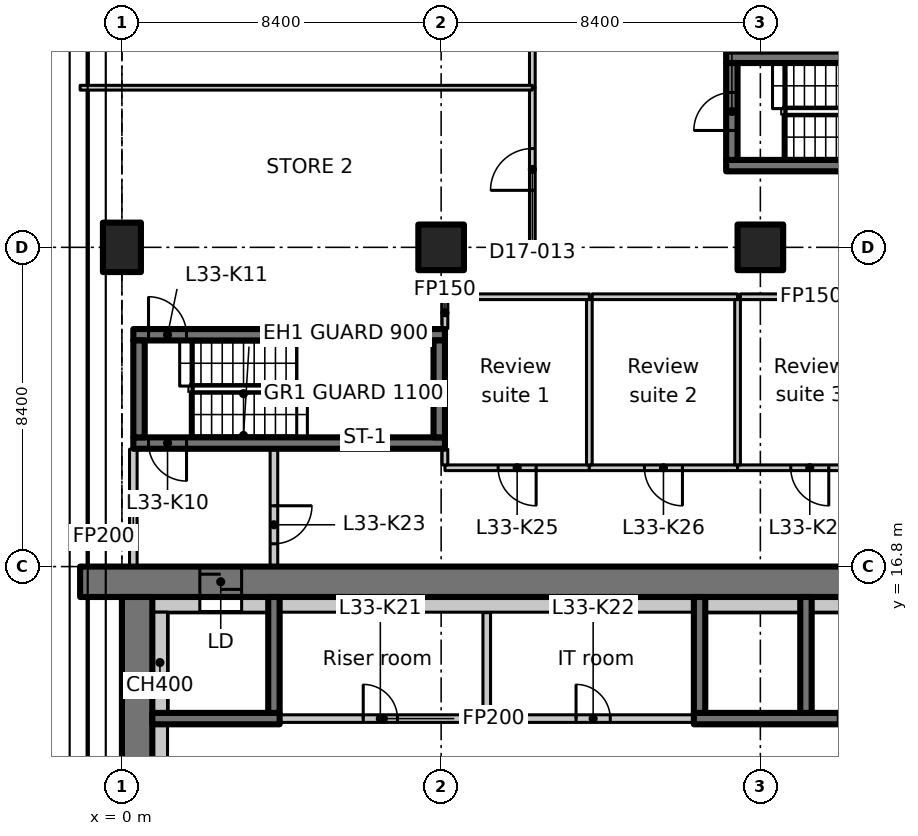
"""IFC4 building model, lengths in metres.
Left out: names, types, materials, properties, quantities, classifications, styles, units other than length and angle.
Written with IfcOpenShell. Run it as: python <this file> out.ifc"""

import sys

from ifc_helpers import new_model, si_unit, direction, frame, frame_2d, origin, origin_2d, place, context, subcontext, project, spatial, polyline, rectangle, outline, extrude, element, fill, save


model = new_model("IFC4")
c1 = context("Model", 3, precision=1e-05, world=origin(), true_north=direction((0.0, 1.0)))
c2 = subcontext(c1, "Body", "Model", "MODEL_VIEW")
j1 = project(units=[si_unit("LENGTHUNIT", "METRE"), si_unit("PLANEANGLEUNIT", "RADIAN")], contexts=[c1])
p1 = place(None, origin())
s1 = spatial("IfcSite", under=j1, at=p1, CompositionType="ELEMENT")
p2 = place(p1, origin())
s2 = spatial("IfcBuilding", under=s1, at=p2, CompositionType="ELEMENT")
p3 = place(p2, frame((0.0, 0.0, 134.9)))
s3 = spatial("IfcBuildingStorey", under=s2, at=p3, CompositionType="ELEMENT", Elevation=134.9)
p4 = place(p3, frame((0.0, 25.2, 0.0), z_axis=(0.0, 0.0, 1.0), x_axis=(1.0, 0.0, 0.0)))
e1 = element("IfcColumn", 1, at=p4, inside=s3, PredefinedType="COLUMN", context=c2, shape_type="SweptSolid", body=[
    extrude(rectangle(XDim=1.0, YDim=1.3, at=origin_2d()), origin(), (0.0, 0.0, 1.0), 3.35),
])
for number, where, z_axis, x_axis in (
    (2, (8.4, 25.2, 0.0), (0.0, 0.0, 1.0), (1.0, 0.0, 0.0)),
    (3, (16.8, 25.2, 0.0), (0.0, 0.0, 1.0), (1.0, 0.0, 0.0)),
):
    element("IfcColumn", number, at=place(p3, frame(where, z_axis=z_axis, x_axis=x_axis)), inside=s3, PredefinedType="COLUMN", context=c2, shape_type="SweptSolid", body=[
        extrude(rectangle(XDim=1.2, YDim=1.2, at=origin_2d()), origin(), (0.0, 0.0, 1.0), 3.35),
    ])
p5 = place(p3, frame((-1.1, 16.4, 0.0), z_axis=(0.0, 0.0, 1.0), x_axis=(1.0, 0.0, 0.0)))
e4 = element("IfcWall", 4, at=p5, inside=s3, PredefinedType="SHEAR", context=c2, shape_type="SweptSolid", body=[
    extrude(rectangle(XDim=22.1, YDim=0.8, at=frame_2d((11.05, 0.0))), origin(), (0.0, 0.0, 1.0), 3.35),
])
p6 = place(p5, frame((3.15, 0.0, 0.0)))
e5 = element("IfcOpeningElement", 5, at=p6, cuts=e4, PredefinedType="OPENING", context=c2, shape_type="SweptSolid", body=[
    extrude(rectangle(XDim=1.1, YDim=2.3, at=frame_2d((0.55, 1.15))), frame((0.0, 0.41, 0.0), z_axis=(0.0, -1.0, 0.0), x_axis=(1.0, 0.0, 0.0)), (0.0, 0.0, 1.0), 0.82),
])
p7 = place(p3, frame((0.4, 7.136, 0.0), z_axis=(0.0, 0.0, 1.0), x_axis=(0.0, 1.0, 0.0)))
e6 = element("IfcWall", 6, at=p7, inside=s3, PredefinedType="SHEAR", context=c2, shape_type="SweptSolid", body=[
    extrude(rectangle(XDim=8.864, YDim=0.8, at=frame_2d((4.432, 0.0))), origin(), (0.0, 0.0, 1.0), 3.35),
])
p8 = place(p3, frame((0.8, 15.8, 0.0), z_axis=(0.0, 0.0, 1.0), x_axis=(1.0, 0.0, 0.0)))
e7 = element("IfcWall", 7, at=p8, inside=s3, PredefinedType="PARTITIONING", context=c2, shape_type="SweptSolid", body=[
    extrude(rectangle(XDim=1.25, YDim=0.4, at=frame_2d((0.625, 0.0))), origin(), (0.0, 0.0, 1.0), 3.35),
])
p9 = place(p3, frame((0.8, 12.8, 0.0), z_axis=(0.0, 0.0, 1.0), x_axis=(1.0, 0.0, 0.0)))
e8 = element("IfcWall", 8, at=p9, inside=s3, PredefinedType="SHEAR", context=c2, shape_type="SweptSolid", body=[
    extrude(rectangle(XDim=3.35, YDim=0.3, at=frame_2d((1.675, 0.0))), origin(), (0.0, 0.0, 1.0), 3.35),
])
p10 = place(p3, frame((4.0, 12.95, 0.0), z_axis=(0.0, 0.0, 1.0), x_axis=(0.0, 1.0, 0.0)))
e9 = element("IfcWall", 9, at=p10, inside=s3, PredefinedType="SHEAR", context=c2, shape_type="SweptSolid", body=[
    extrude(rectangle(XDim=3.05, YDim=0.3, at=frame_2d((1.525, 0.0))), origin(), (0.0, 0.0, 1.0), 3.35),
])
p11 = place(p3, frame((15.05, 12.8, 0.0), z_axis=(0.0, 0.0, 1.0), x_axis=(1.0, 0.0, 0.0)))
e10 = element("IfcWall", 10, at=p11, inside=s3, PredefinedType="SHEAR", context=c2, shape_type="SweptSolid", body=[
    extrude(rectangle(XDim=5.9, YDim=0.3, at=frame_2d((2.95, 0.0))), origin(), (0.0, 0.0, 1.0), 3.35),
])
p12 = place(p11, frame((3.8, 0.0, 0.0)))
e11 = element("IfcOpeningElement", 11, at=p12, cuts=e10, PredefinedType="OPENING", context=c2, shape_type="SweptSolid", body=[
    extrude(rectangle(XDim=1.1, YDim=2.3, at=frame_2d((0.55, 1.15))), frame((0.0, 0.16, 0.0), z_axis=(0.0, -1.0, 0.0), x_axis=(1.0, 0.0, 0.0)), (0.0, 0.0, 1.0), 0.32),
])
for number, where, z_axis, x_axis in (
    (12, (15.2, 12.95, 0.0), (0.0, 0.0, 1.0), (0.0, 1.0, 0.0)),
    (13, (18.0, 12.95, 0.0), (0.0, 0.0, 1.0), (0.0, 1.0, 0.0)),
):
    element("IfcWall", number, at=place(p3, frame(where, z_axis=z_axis, x_axis=x_axis)), inside=s3, PredefinedType="SHEAR", context=c2, shape_type="SweptSolid", body=[
        extrude(rectangle(XDim=3.05, YDim=0.3, at=frame_2d((1.525, 0.0))), origin(), (0.0, 0.0, 1.0), 3.35),
    ])
p13 = place(p3, frame((8.5, 20.05, 0.0), z_axis=(0.0, 0.0, 1.0), x_axis=(-1.0, 0.0, 0.0)))
e14 = element("IfcWall", 14, at=p13, inside=s3, PredefinedType="SHEAR", context=c2, shape_type="SweptSolid", body=[
    extrude(rectangle(XDim=8.2, YDim=0.3, at=frame_2d((4.1, 0.0))), origin(), (0.0, 0.0, 1.0), 3.35),
])
p14 = place(p13, frame((6.8, 0.0, 0.0)))
e15 = element("IfcOpeningElement", 15, at=p14, cuts=e14, PredefinedType="OPENING", context=c2, shape_type="SweptSolid", body=[
    extrude(rectangle(XDim=1.0, YDim=2.1, at=frame_2d((0.5, 1.05))), frame((0.0, 0.16, 0.0), z_axis=(0.0, -1.0, 0.0), x_axis=(1.0, 0.0, 0.0)), (0.0, 0.0, 1.0), 0.32),
])
p15 = place(p3, frame((0.3, 22.9, 0.0), z_axis=(0.0, 0.0, 1.0), x_axis=(1.0, 0.0, 0.0)))
e16 = element("IfcWall", 16, at=p15, inside=s3, PredefinedType="SHEAR", context=c2, shape_type="SweptSolid", body=[
    extrude(rectangle(XDim=8.2, YDim=0.3, at=frame_2d((4.1, 0.0))), origin(), (0.0, 0.0, 1.0), 3.35),
])
p16 = place(p15, frame((0.4, 0.0, 0.0)))
e17 = element("IfcOpeningElement", 17, at=p16, cuts=e16, PredefinedType="OPENING", context=c2, shape_type="SweptSolid", body=[
    extrude(rectangle(XDim=1.0, YDim=2.1, at=frame_2d((0.5, 1.05))), frame((0.0, 0.16, 0.0), z_axis=(0.0, -1.0, 0.0), x_axis=(1.0, 0.0, 0.0)), (0.0, 0.0, 1.0), 0.32),
])
for number, where, z_axis, x_axis in (
    (18, (0.45, 20.2, 0.0), (0.0, 0.0, 1.0), (0.0, 1.0, 0.0)),
    (19, (8.35, 20.2, 0.0), (0.0, 0.0, 1.0), (0.0, 1.0, 0.0)),
):
    element("IfcWall", number, at=place(p3, frame(where, z_axis=z_axis, x_axis=x_axis)), inside=s3, PredefinedType="SHEAR", context=c2, shape_type="SweptSolid", body=[
        extrude(rectangle(XDim=2.55, YDim=0.3, at=frame_2d((1.275, 0.0))), origin(), (0.0, 0.0, 1.0), 3.35),
    ])
for number, where, z_axis, x_axis in (
    (20, (15.9, 27.35, 0.0), (0.0, 0.0, 1.0), (1.0, 0.0, 0.0)),
    (21, (15.9, 30.2, 0.0), (0.0, 0.0, 1.0), (1.0, 0.0, 0.0)),
):
    element("IfcWall", number, at=place(p3, frame(where, z_axis=z_axis, x_axis=x_axis)), inside=s3, PredefinedType="SHEAR", context=c2, shape_type="SweptSolid", body=[
        extrude(rectangle(XDim=8.2, YDim=0.3, at=frame_2d((4.1, 0.0))), origin(), (0.0, 0.0, 1.0), 3.35),
    ])
p17 = place(p3, frame((16.05, 27.5, 0.0), z_axis=(0.0, 0.0, 1.0), x_axis=(0.0, 1.0, 0.0)))
e22 = element("IfcWall", 22, at=p17, inside=s3, PredefinedType="SHEAR", context=c2, shape_type="SweptSolid", body=[
    extrude(rectangle(XDim=2.55, YDim=0.3, at=frame_2d((1.275, 0.0))), origin(), (0.0, 0.0, 1.0), 3.35),
])
p18 = place(p17, frame((0.775, 0.0, 0.0)))
e23 = element("IfcOpeningElement", 23, at=p18, cuts=e22, PredefinedType="OPENING", context=c2, shape_type="SweptSolid", body=[
    extrude(rectangle(XDim=1.0, YDim=2.1, at=frame_2d((0.5, 1.05))), frame((0.0, 0.16, 0.0), z_axis=(0.0, -1.0, 0.0), x_axis=(1.0, 0.0, 0.0)), (0.0, 0.0, 1.0), 0.32),
])
p19 = place(p3, frame((0.3, 16.812, 0.0), z_axis=(0.0, 0.0, 1.0), x_axis=(0.0, 1.0, 0.0)))
e24 = element("IfcWall", 24, at=p19, inside=s3, PredefinedType="PARTITIONING", context=c2, shape_type="SweptSolid", body=[
    extrude(rectangle(XDim=3.076, YDim=0.2, at=frame_2d((1.538, 0.0))), origin(), (0.0, 0.0, 1.0), 2.98),
])
p20 = place(p3, frame((4.0, 19.888, 0.0), z_axis=(0.0, 0.0, 1.0), x_axis=(0.0, -1.0, 0.0)))
e25 = element("IfcWall", 25, at=p20, inside=s3, PredefinedType="PARTITIONING", context=c2, shape_type="SweptSolid", body=[
    extrude(rectangle(XDim=3.076, YDim=0.2, at=frame_2d((1.538, 0.0))), origin(), (0.0, 0.0, 1.0), 3.35),
])
p21 = place(p20, frame((1.488, 0.0, 0.0)))
e26 = element("IfcOpeningElement", 26, at=p21, cuts=e25, PredefinedType="OPENING", context=c2, shape_type="SweptSolid", body=[
    extrude(rectangle(XDim=1.0, YDim=2.1, at=frame_2d((0.5, 1.05))), frame((0.0, 0.11, 0.0), z_axis=(0.0, -1.0, 0.0), x_axis=(1.0, 0.0, 0.0)), (0.0, 0.0, 1.0), 0.22),
])
p22 = place(p3, frame((4.162, 12.8, 0.0), z_axis=(0.0, 0.0, 1.0), x_axis=(1.0, 0.0, 0.0)))
e27 = element("IfcWall", 27, at=p22, inside=s3, PredefinedType="PARTITIONING", context=c2, shape_type="SweptSolid", body=[
    extrude(rectangle(XDim=5.438, YDim=0.2, at=frame_2d((2.719, 0.0))), origin(), (0.0, 0.0, 1.0), 3.35),
])
p23 = place(p22, frame((2.188, 0.0, 0.0)))
e28 = element("IfcOpeningElement", 28, at=p23, cuts=e27, PredefinedType="OPENING", context=c2, shape_type="SweptSolid", body=[
    extrude(rectangle(XDim=0.9, YDim=2.1, at=frame_2d((0.45, 1.05))), frame((0.0, 0.11, 0.0), z_axis=(0.0, -1.0, 0.0), x_axis=(1.0, 0.0, 0.0)), (0.0, 0.0, 1.0), 0.22),
])
p24 = place(p3, frame((9.6, 12.8, 0.0), z_axis=(0.0, 0.0, 1.0), x_axis=(1.0, 0.0, 0.0)))
e29 = element("IfcWall", 29, at=p24, inside=s3, PredefinedType="PARTITIONING", context=c2, shape_type="SweptSolid", body=[
    extrude(rectangle(XDim=5.438, YDim=0.2, at=frame_2d((2.719, 0.0))), origin(), (0.0, 0.0, 1.0), 3.35),
])
p25 = place(p24, frame((2.35, 0.0, 0.0)))
e30 = element("IfcOpeningElement", 30, at=p25, cuts=e29, PredefinedType="OPENING", context=c2, shape_type="SweptSolid", body=[
    extrude(rectangle(XDim=0.9, YDim=2.1, at=frame_2d((0.45, 1.05))), frame((0.0, 0.11, 0.0), z_axis=(0.0, -1.0, 0.0), x_axis=(1.0, 0.0, 0.0)), (0.0, 0.0, 1.0), 0.22),
])
p26 = place(p3, frame((9.6, 15.588, 0.0), z_axis=(0.0, 0.0, 1.0), x_axis=(0.0, -1.0, 0.0)))
e31 = element("IfcWall", 31, at=p26, inside=s3, PredefinedType="PARTITIONING", context=c2, shape_type="SweptSolid", body=[
    extrude(rectangle(XDim=2.688, YDim=0.2, at=frame_2d((1.344, 0.0))), origin(), (0.0, 0.0, 1.0), 3.35),
])
p27 = place(p3, frame((12.3, 19.4, 0.0), z_axis=(0.0, 0.0, 1.0), x_axis=(-1.0, 0.0, 0.0)))
e32 = element("IfcWall", 32, at=p27, inside=s3, PredefinedType="PARTITIONING", context=c2, shape_type="SweptSolid", body=[
    extrude(rectangle(XDim=3.8, YDim=0.15, at=frame_2d((1.9, 0.0))), origin(), (0.0, 0.0, 1.0), 3.35),
])
p28 = place(p27, frame((1.4, 0.0, 0.0)))
e33 = element("IfcOpeningElement", 33, at=p28, cuts=e32, PredefinedType="OPENING", context=c2, shape_type="SweptSolid", body=[
    extrude(rectangle(XDim=1.0, YDim=2.1, at=frame_2d((0.5, 1.05))), frame((0.0, 0.085, 0.0), z_axis=(0.0, -1.0, 0.0), x_axis=(1.0, 0.0, 0.0)), (0.0, 0.0, 1.0), 0.17),
])
p29 = place(p3, frame((8.5, 19.475, 0.0), z_axis=(0.0, 0.0, 1.0), x_axis=(0.0, 1.0, 0.0)))
e34 = element("IfcWall", 34, at=p29, inside=s3, PredefinedType="PARTITIONING", context=c2, shape_type="SweptSolid", body=[
    extrude(rectangle(XDim=0.413, YDim=0.15, at=frame_2d((0.207, 0.0))), origin(), (0.0, 0.0, 1.0), 3.35),
])
p30 = place(p3, frame((8.5, 23.062, 0.0), z_axis=(0.0, 0.0, 1.0), x_axis=(0.0, 1.0, 0.0)))
e35 = element("IfcWall", 35, at=p30, inside=s3, PredefinedType="PARTITIONING", context=c2, shape_type="SweptSolid", body=[
    extrude(rectangle(XDim=0.838, YDim=0.15, at=frame_2d((0.419, 0.0))), origin(), (0.0, 0.0, 1.0), 3.35),
])
p31 = place(p3, frame((8.575, 23.9, 0.0), z_axis=(0.0, 0.0, 1.0), x_axis=(1.0, 0.0, 0.0)))
e36 = element("IfcWall", 36, at=p31, inside=s3, PredefinedType="PARTITIONING", context=c2, shape_type="SweptSolid", body=[
    extrude(rectangle(XDim=3.725, YDim=0.15, at=frame_2d((1.863, 0.0))), origin(), (0.0, 0.0, 1.0), 3.35),
])
p32 = place(p3, frame((16.2, 19.4, 0.0), z_axis=(0.0, 0.0, 1.0), x_axis=(-1.0, 0.0, 0.0)))
e37 = element("IfcWall", 37, at=p32, inside=s3, PredefinedType="PARTITIONING", context=c2, shape_type="SweptSolid", body=[
    extrude(rectangle(XDim=3.9, YDim=0.15, at=frame_2d((1.95, 0.0))), origin(), (0.0, 0.0, 1.0), 3.35),
])
p33 = place(p32, frame((1.45, 0.0, 0.0)))
e38 = element("IfcOpeningElement", 38, at=p33, cuts=e37, PredefinedType="OPENING", context=c2, shape_type="SweptSolid", body=[
    extrude(rectangle(XDim=1.0, YDim=2.1, at=frame_2d((0.5, 1.05))), frame((0.0, 0.085, 0.0), z_axis=(0.0, -1.0, 0.0), x_axis=(1.0, 0.0, 0.0)), (0.0, 0.0, 1.0), 0.17),
])
p34 = place(p3, frame((12.3, 23.825, 0.0), z_axis=(0.0, 0.0, 1.0), x_axis=(0.0, -1.0, 0.0)))
e39 = element("IfcWall", 39, at=p34, inside=s3, PredefinedType="PARTITIONING", context=c2, shape_type="SweptSolid", body=[
    extrude(rectangle(XDim=4.35, YDim=0.15, at=frame_2d((2.175, 0.0))), origin(), (0.0, 0.0, 1.0), 3.35),
])
p35 = place(p3, frame((12.375, 23.9, 0.0), z_axis=(0.0, 0.0, 1.0), x_axis=(1.0, 0.0, 0.0)))
e40 = element("IfcWall", 40, at=p35, inside=s3, PredefinedType="PARTITIONING", context=c2, shape_type="SweptSolid", body=[
    extrude(rectangle(XDim=3.825, YDim=0.15, at=frame_2d((1.913, 0.0))), origin(), (0.0, 0.0, 1.0), 3.35),
])
p36 = place(p3, frame((19.925, 19.4, 0.0), z_axis=(0.0, 0.0, 1.0), x_axis=(-1.0, 0.0, 0.0)))
e41 = element("IfcWall", 41, at=p36, inside=s3, PredefinedType="PARTITIONING", context=c2, shape_type="SweptSolid", body=[
    extrude(rectangle(XDim=3.725, YDim=0.15, at=frame_2d((1.863, 0.0))), origin(), (0.0, 0.0, 1.0), 3.35),
])
p37 = place(p36, frame((1.325, 0.0, 0.0)))
e42 = element("IfcOpeningElement", 42, at=p37, cuts=e41, PredefinedType="OPENING", context=c2, shape_type="SweptSolid", body=[
    extrude(rectangle(XDim=1.0, YDim=2.1, at=frame_2d((0.5, 1.05))), frame((0.0, 0.085, 0.0), z_axis=(0.0, -1.0, 0.0), x_axis=(1.0, 0.0, 0.0)), (0.0, 0.0, 1.0), 0.17),
])
p38 = place(p3, frame((16.2, 23.825, 0.0), z_axis=(0.0, 0.0, 1.0), x_axis=(0.0, -1.0, 0.0)))
e43 = element("IfcWall", 43, at=p38, inside=s3, PredefinedType="PARTITIONING", context=c2, shape_type="SweptSolid", body=[
    extrude(rectangle(XDim=4.35, YDim=0.15, at=frame_2d((2.175, 0.0))), origin(), (0.0, 0.0, 1.0), 3.35),
])
p39 = place(p3, frame((16.275, 23.9, 0.0), z_axis=(0.0, 0.0, 1.0), x_axis=(1.0, 0.0, 0.0)))
e44 = element("IfcWall", 44, at=p39, inside=s3, PredefinedType="PARTITIONING", context=c2, shape_type="SweptSolid", body=[
    extrude(rectangle(XDim=3.725, YDim=0.15, at=frame_2d((1.863, 0.0))), origin(), (0.0, 0.0, 1.0), 3.35),
])
p40 = place(p3, frame((1.0, 9.75, 0.0), z_axis=(0.0, 0.0, 1.0), x_axis=(0.0, 1.0, 0.0)))
e45 = element("IfcWall", 45, at=p40, inside=s3, PredefinedType="PARTITIONING", context=c2, shape_type="SweptSolid", body=[
    extrude(rectangle(XDim=2.9, YDim=0.4, at=frame_2d((1.45, 0.0))), origin(), (0.0, 0.0, 1.0), 3.35),
])
p41 = place(p3, frame((1.0, 12.95, 0.0), z_axis=(0.0, 0.0, 1.0), x_axis=(0.0, 1.0, 0.0)))
e46 = element("IfcWall", 46, at=p41, inside=s3, PredefinedType="PARTITIONING", context=c2, shape_type="SweptSolid", body=[
    extrude(rectangle(XDim=2.65, YDim=0.4, at=frame_2d((1.325, 0.0))), origin(), (0.0, 0.0, 1.0), 3.35),
])
p42 = place(p3, frame((3.15, 15.8, 0.0), z_axis=(0.0, 0.0, 1.0), x_axis=(1.0, 0.0, 0.0)))
e47 = element("IfcWall", 47, at=p42, inside=s3, PredefinedType="PARTITIONING", context=c2, shape_type="SweptSolid", body=[
    extrude(rectangle(XDim=0.7, YDim=0.4, at=frame_2d((0.35, 0.0))), origin(), (0.0, 0.0, 1.0), 3.35),
])
p43 = place(p3, frame((4.15, 15.8, 0.0), z_axis=(0.0, 0.0, 1.0), x_axis=(1.0, 0.0, 0.0)))
e48 = element("IfcWall", 48, at=p43, inside=s3, PredefinedType="PARTITIONING", context=c2, shape_type="SweptSolid", body=[
    extrude(rectangle(XDim=10.9, YDim=0.4, at=frame_2d((5.45, 0.0))), origin(), (0.0, 0.0, 1.0), 3.35),
])
for number, where, z_axis, x_axis in (
    (49, (15.35, 15.8, 0.0), (0.0, 0.0, 1.0), (1.0, 0.0, 0.0)),
    (50, (18.15, 15.8, 0.0), (0.0, 0.0, 1.0), (1.0, 0.0, 0.0)),
):
    element("IfcWall", number, at=place(p3, frame(where, z_axis=z_axis, x_axis=x_axis)), inside=s3, PredefinedType="PARTITIONING", context=c2, shape_type="SweptSolid", body=[
        extrude(rectangle(XDim=2.5, YDim=0.4, at=frame_2d((1.25, 0.0))), origin(), (0.0, 0.0, 1.0), 3.35),
    ])
p44 = place(p3, frame((10.8, 25.2, 0.0), z_axis=(0.0, 0.0, 1.0), x_axis=(0.0, 1.0, 0.0)))
e51 = element("IfcWall", 51, at=p44, inside=s3, PredefinedType="PARTITIONING", context=c2, shape_type="SweptSolid", body=[
    extrude(rectangle(XDim=4.2, YDim=0.15, at=frame_2d((2.1, 0.0))), origin(), (0.0, 0.0, 1.0), 3.33),
])
p45 = place(p44, frame((1.5, 0.0, 0.0)))
e52 = element("IfcOpeningElement", 52, at=p45, cuts=e51, PredefinedType="OPENING", context=c2, shape_type="SweptSolid", body=[
    extrude(rectangle(XDim=1.1, YDim=2.1, at=frame_2d((0.55, 1.05))), frame((0.0, 0.085, 0.0), z_axis=(0.0, -1.0, 0.0), x_axis=(1.0, 0.0, 0.0)), (0.0, 0.0, 1.0), 0.17),
])
p46 = place(p3, frame((10.8, 29.4, 0.0), z_axis=(0.0, 0.0, 1.0), x_axis=(0.0, 1.0, 0.0)))
e53 = element("IfcWall", 53, at=p46, inside=s3, PredefinedType="PARTITIONING", context=c2, shape_type="SweptSolid", body=[
    extrude(rectangle(XDim=4.2, YDim=0.15, at=frame_2d((2.1, 0.0))), origin(), (0.0, 0.0, 1.0), 3.33),
])
p47 = place(p46, frame((1.2, 0.0, 0.0)))
e54 = element("IfcOpeningElement", 54, at=p47, cuts=e53, PredefinedType="OPENING", context=c2, shape_type="SweptSolid", body=[
    extrude(rectangle(XDim=1.6, YDim=2.1, at=frame_2d((0.8, 1.05))), frame((0.0, 0.085, 0.0), z_axis=(0.0, -1.0, 0.0), x_axis=(1.0, 0.0, 0.0)), (0.0, 0.0, 1.0), 0.17),
])
p48 = place(p3, frame((-1.1, 29.4, 0.0), z_axis=(0.0, 0.0, 1.0), x_axis=(1.0, 0.0, 0.0)))
e55 = element("IfcWall", 55, at=p48, inside=s3, PredefinedType="PARTITIONING", context=c2, shape_type="SweptSolid", body=[
    extrude(outline(polyline([(0.0, 0.0), (11.9, 0.0), (11.9, 3.33), (1.55, 3.33), (1.548, 2.98), (0.652, 2.98), (0.65, 3.33), (0.0, 3.33), (0.0, 0.0)])), frame((0.0, 0.062, 0.0), z_axis=(0.0, -1.0, 0.0), x_axis=(1.0, 0.0, 0.0)), (0.0, 0.0, 1.0), 0.125),
])
p49 = place(p6, origin())
e56 = element("IfcDoor", 56, at=p49, inside=s3, OperationType="SLIDING_TO_LEFT", PredefinedType="DOOR", context=c2, shape_type="SweptSolid", body=[
    extrude(rectangle(XDim=1.1, YDim=2.3, at=frame_2d((0.55, 1.15))), frame((0.0, 0.025, 0.0), z_axis=(0.0, -1.0, 0.0), x_axis=(1.0, 0.0, 0.0)), (0.0, 0.0, 1.0), 0.05),
])
fill(e5, e56)
p50 = place(p14, origin())
e57 = element("IfcDoor", 57, at=p50, inside=s3, OperationType="SINGLE_SWING_RIGHT", PredefinedType="DOOR", context=c2, shape_type="SweptSolid", body=[
    extrude(rectangle(XDim=1.0, YDim=2.1, at=frame_2d((0.5, 1.05))), frame((0.0, 0.025, 0.0), z_axis=(0.0, -1.0, 0.0), x_axis=(1.0, 0.0, 0.0)), (0.0, 0.0, 1.0), 0.05),
])
fill(e15, e57)
p51 = place(p16, origin())
e58 = element("IfcDoor", 58, at=p51, inside=s3, OperationType="SINGLE_SWING_LEFT", PredefinedType="DOOR", context=c2, shape_type="SweptSolid", body=[
    extrude(rectangle(XDim=1.0, YDim=2.1, at=frame_2d((0.5, 1.05))), frame((0.0, 0.025, 0.0), z_axis=(0.0, -1.0, 0.0), x_axis=(1.0, 0.0, 0.0)), (0.0, 0.0, 1.0), 0.05),
])
fill(e17, e58)
p52 = place(p18, origin())
e59 = element("IfcDoor", 59, at=p52, inside=s3, OperationType="SINGLE_SWING_RIGHT", PredefinedType="DOOR", context=c2, shape_type="SweptSolid", body=[
    extrude(rectangle(XDim=1.0, YDim=2.1, at=frame_2d((0.5, 1.05))), frame((0.0, 0.025, 0.0), z_axis=(0.0, -1.0, 0.0), x_axis=(1.0, 0.0, 0.0)), (0.0, 0.0, 1.0), 0.05),
])
fill(e23, e59)
p53 = place(p23, origin())
e60 = element("IfcDoor", 60, at=p53, inside=s3, OperationType="SINGLE_SWING_LEFT", PredefinedType="DOOR", context=c2, shape_type="SweptSolid", body=[
    extrude(rectangle(XDim=0.9, YDim=2.1, at=frame_2d((0.45, 1.05))), frame((0.0, 0.025, 0.0), z_axis=(0.0, -1.0, 0.0), x_axis=(1.0, 0.0, 0.0)), (0.0, 0.0, 1.0), 0.05),
])
fill(e28, e60)
p54 = place(p25, origin())
e61 = element("IfcDoor", 61, at=p54, inside=s3, OperationType="SINGLE_SWING_RIGHT", PredefinedType="DOOR", context=c2, shape_type="SweptSolid", body=[
    extrude(rectangle(XDim=0.9, YDim=2.1, at=frame_2d((0.45, 1.05))), frame((0.0, 0.025, 0.0), z_axis=(0.0, -1.0, 0.0), x_axis=(1.0, 0.0, 0.0)), (0.0, 0.0, 1.0), 0.05),
])
fill(e30, e61)
p55 = place(p21, origin())
e62 = element("IfcDoor", 62, at=p55, inside=s3, OperationType="SINGLE_SWING_LEFT", PredefinedType="DOOR", context=c2, shape_type="SweptSolid", body=[
    extrude(rectangle(XDim=1.0, YDim=2.1, at=frame_2d((0.5, 1.05))), frame((0.0, 0.025, 0.0), z_axis=(0.0, -1.0, 0.0), x_axis=(1.0, 0.0, 0.0)), (0.0, 0.0, 1.0), 0.05),
])
fill(e26, e62)
p56 = place(p28, origin())
e63 = element("IfcDoor", 63, at=p56, inside=s3, OperationType="SINGLE_SWING_LEFT", PredefinedType="DOOR", context=c2, shape_type="SweptSolid", body=[
    extrude(rectangle(XDim=1.0, YDim=2.1, at=frame_2d((0.5, 1.05))), frame((0.0, 0.025, 0.0), z_axis=(0.0, -1.0, 0.0), x_axis=(1.0, 0.0, 0.0)), (0.0, 0.0, 1.0), 0.05),
])
fill(e33, e63)
p57 = place(p33, origin())
e64 = element("IfcDoor", 64, at=p57, inside=s3, OperationType="SINGLE_SWING_RIGHT", PredefinedType="DOOR", context=c2, shape_type="SweptSolid", body=[
    extrude(rectangle(XDim=1.0, YDim=2.1, at=frame_2d((0.5, 1.05))), frame((0.0, 0.025, 0.0), z_axis=(0.0, -1.0, 0.0), x_axis=(1.0, 0.0, 0.0)), (0.0, 0.0, 1.0), 0.05),
])
fill(e38, e64)
p58 = place(p37, origin())
e65 = element("IfcDoor", 65, at=p58, inside=s3, OperationType="SINGLE_SWING_LEFT", PredefinedType="DOOR", context=c2, shape_type="SweptSolid", body=[
    extrude(rectangle(XDim=1.0, YDim=2.1, at=frame_2d((0.5, 1.05))), frame((0.0, 0.025, 0.0), z_axis=(0.0, -1.0, 0.0), x_axis=(1.0, 0.0, 0.0)), (0.0, 0.0, 1.0), 0.05),
])
fill(e42, e65)
p59 = place(p45, origin())
e66 = element("IfcDoor", 66, at=p59, inside=s3, OperationType="SINGLE_SWING_LEFT", PredefinedType="DOOR", context=c2, shape_type="SweptSolid", body=[
    extrude(rectangle(XDim=1.1, YDim=2.1, at=frame_2d((0.55, 1.05))), frame((0.0, 0.025, 0.0), z_axis=(0.0, -1.0, 0.0), x_axis=(1.0, 0.0, 0.0)), (0.0, 0.0, 1.0), 0.05),
])
fill(e52, e66)
save(model, sys.argv[1])
